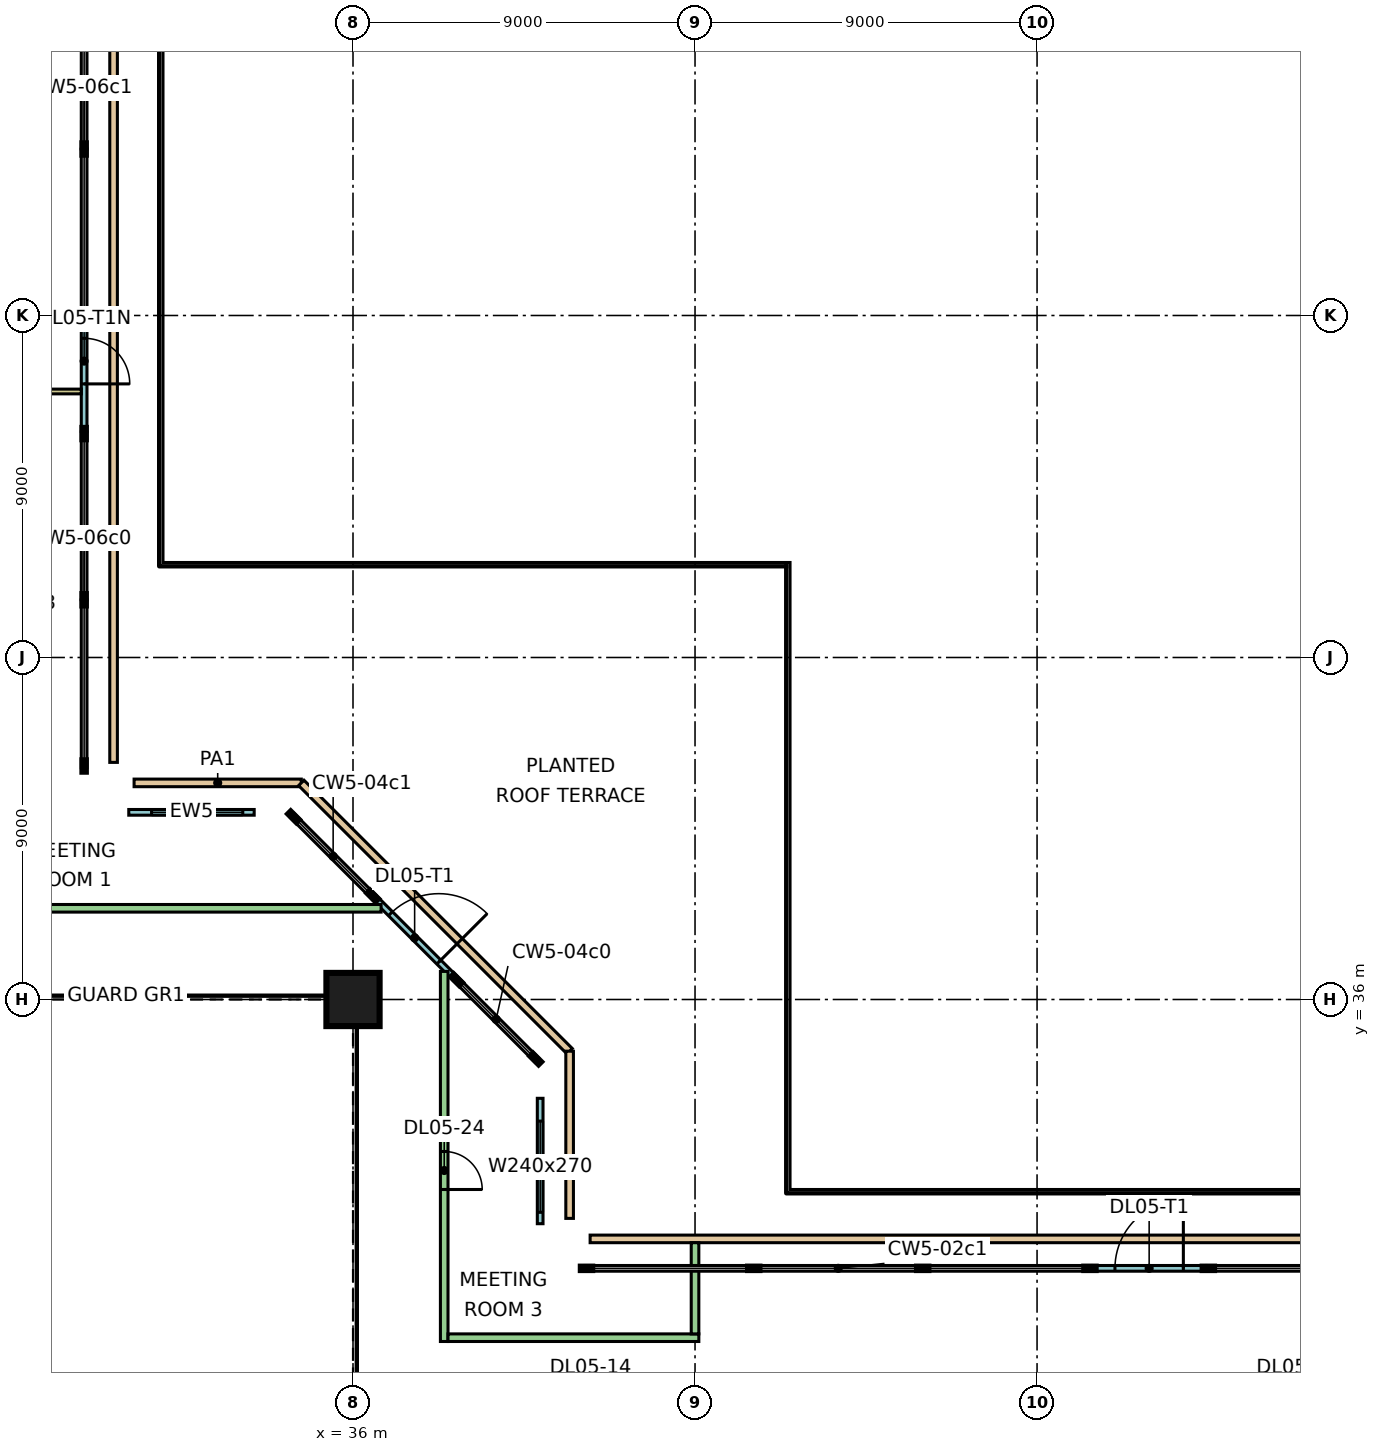
"""IFC4 building model, lengths in metres.
Left out: names, types, materials, properties, quantities, classifications, styles, units other than length and angle.
Written with IfcOpenShell. Run it as: python <this file> out.ifc"""

import sys

from ifc_helpers import new_model, si_unit, direction, frame, frame_2d, origin, origin_2d, place, context, subcontext, project, spatial, rectangle, extrude, element, fill, save


model = new_model("IFC4")
c1 = context("Model", 3, precision=1e-05, world=origin(), true_north=direction((0.0, 1.0)))
c2 = subcontext(c1, "Body", "Model", "MODEL_VIEW")
j1 = project(units=[si_unit("LENGTHUNIT", "METRE"), si_unit("PLANEANGLEUNIT", "RADIAN")], contexts=[c1])
p1 = place(None, origin())
s1 = spatial("IfcSite", under=j1, at=p1, CompositionType="ELEMENT")
p2 = place(p1, origin())
s2 = spatial("IfcBuilding", under=s1, at=p2, CompositionType="ELEMENT")
p3 = place(p2, frame((0.0, 0.0, 26.4)))
s3 = spatial("IfcBuildingStorey", under=s2, at=p3, CompositionType="ELEMENT", Elevation=26.4)
p4 = place(p3, frame((36.0, 36.0, 0.0), z_axis=(0.0, 0.0, 1.0), x_axis=(1.0, 0.0, 0.0)))
e1 = element("IfcColumn", 1, at=p4, inside=s3, PredefinedType="COLUMN", context=c2, shape_type="SweptSolid", body=[
    extrude(rectangle(XDim=1.4, YDim=1.4, at=origin_2d()), origin(), (0.0, 0.0, 1.0), 9.0),
])
p5 = place(p3, frame((58.45, 28.925, 0.0), z_axis=(0.0, 0.0, 1.0), x_axis=(-1.0, 0.0, 0.0)))
e2 = element("IfcWall", 2, at=p5, inside=s3, PredefinedType="SOLIDWALL", context=c2, shape_type="SweptSolid", body=[
    extrude(rectangle(XDim=3.0, YDim=0.15, at=frame_2d((1.5, 0.0))), origin(), (0.0, 0.0, 1.0), 8.45),
])
p6 = place(p5, frame((0.6, 0.0, 0.0)))
e3 = element("IfcOpeningElement", 3, at=p6, cuts=e2, PredefinedType="OPENING", context=c2, shape_type="SweptSolid", body=[
    extrude(rectangle(XDim=1.8, YDim=2.4, at=frame_2d((0.9, 1.2))), frame((0.0, 0.085, 0.0), z_axis=(0.0, -1.0, 0.0), x_axis=(1.0, 0.0, 0.0)), (0.0, 0.0, 1.0), 0.17),
])
p7 = place(p3, frame((40.925, 30.1, 0.0), z_axis=(0.0, 0.0, 1.0), x_axis=(0.0, 1.0, 0.0)))
e4 = element("IfcWall", 4, at=p7, inside=s3, PredefinedType="SOLIDWALL", context=c2, shape_type="SweptSolid", body=[
    extrude(rectangle(XDim=3.3, YDim=0.15, at=frame_2d((1.65, 0.0))), origin(), (0.0, 0.0, 1.0), 8.45),
])
p8 = place(p7, frame((0.3, 0.0, 0.9)))
e5 = element("IfcOpeningElement", 5, at=p8, cuts=e4, PredefinedType="OPENING", context=c2, shape_type="SweptSolid", body=[
    extrude(rectangle(XDim=2.4, YDim=2.7, at=frame_2d((1.2, 1.35))), frame((0.0, 0.085, 0.0), z_axis=(0.0, -1.0, 0.0), x_axis=(1.0, 0.0, 0.0)), (0.0, 0.0, 1.0), 0.17),
])
p9 = place(p3, frame((38.682, 36.561, 0.0), z_axis=(0.0, 0.0, 1.0), x_axis=(-0.707106781187, 0.707106781187, 0.0)))
e6 = element("IfcWall", 6, at=p9, inside=s3, PredefinedType="SOLIDWALL", context=c2, shape_type="SweptSolid", body=[
    extrude(rectangle(XDim=3.0, YDim=0.15, at=frame_2d((1.5, 0.0))), origin(), (0.0, 0.0, 1.0), 8.45),
])
p10 = place(p9, frame((0.6, 0.0, 0.0)))
e7 = element("IfcOpeningElement", 7, at=p10, cuts=e6, PredefinedType="OPENING", context=c2, shape_type="SweptSolid", body=[
    extrude(rectangle(XDim=1.8, YDim=2.4, at=frame_2d((0.9, 1.2))), frame((0.0, 0.085, 0.0), z_axis=(0.0, -1.0, 0.0), x_axis=(1.0, 0.0, 0.0)), (0.0, 0.0, 1.0), 0.17),
])
p11 = place(p3, frame((33.4, 40.925, 0.0), z_axis=(0.0, 0.0, 1.0), x_axis=(-1.0, 0.0, 0.0)))
e8 = element("IfcWall", 8, at=p11, inside=s3, PredefinedType="SOLIDWALL", context=c2, shape_type="SweptSolid", body=[
    extrude(rectangle(XDim=3.3, YDim=0.15, at=frame_2d((1.65, 0.0))), origin(), (0.0, 0.0, 1.0), 8.45),
])
p12 = place(p11, frame((0.3, 0.0, 0.9)))
e9 = element("IfcOpeningElement", 9, at=p12, cuts=e8, PredefinedType="OPENING", context=c2, shape_type="SweptSolid", body=[
    extrude(rectangle(XDim=2.4, YDim=2.7, at=frame_2d((1.2, 1.35))), frame((0.0, 0.085, 0.0), z_axis=(0.0, -1.0, 0.0), x_axis=(1.0, 0.0, 0.0)), (0.0, 0.0, 1.0), 0.17),
])
p13 = place(p3, frame((28.925, 50.95, 0.0), z_axis=(0.0, 0.0, 1.0), x_axis=(0.0, 1.0, 0.0)))
e10 = element("IfcWall", 10, at=p13, inside=s3, PredefinedType="SOLIDWALL", context=c2, shape_type="SweptSolid", body=[
    extrude(rectangle(XDim=3.0, YDim=0.15, at=frame_2d((1.5, 0.0))), origin(), (0.0, 0.0, 1.0), 8.45),
])
p14 = place(p13, frame((1.25, 0.0, 0.0)))
e11 = element("IfcOpeningElement", 11, at=p14, cuts=e10, PredefinedType="OPENING", context=c2, shape_type="SweptSolid", body=[
    extrude(rectangle(XDim=1.2, YDim=2.4, at=frame_2d((0.6, 1.2))), frame((0.0, 0.085, 0.0), z_axis=(0.0, -1.0, 0.0), x_axis=(1.0, 0.0, 0.0)), (0.0, 0.0, 1.0), 0.17),
])
p15 = place(p3, frame((29.7, 63.24, 0.0), z_axis=(0.0, 0.0, 1.0), x_axis=(0.0, -1.0, 0.0)))
e12 = element("IfcWall", 12, at=p15, inside=s3, PredefinedType="PARAPET", context=c2, shape_type="SweptSolid", body=[
    extrude(rectangle(XDim=21.0, YDim=0.2, at=frame_2d((10.5, 0.0))), origin(), (0.0, 0.0, 1.0), 0.5),
])
p16 = place(p3, frame((30.24, 41.7, 0.0), z_axis=(0.0, 0.0, 1.0), x_axis=(1.0, 0.0, 0.0)))
e13 = element("IfcWall", 13, at=p16, inside=s3, PredefinedType="PARAPET", context=c2, shape_type="SweptSolid", body=[
    extrude(rectangle(XDim=4.4, YDim=0.2, at=frame_2d((2.2, 0.0))), origin(), (0.0, 0.0, 1.0), 0.5),
])
p17 = place(p3, frame((34.64, 41.7, 0.0), z_axis=(0.0, 0.0, 1.0), x_axis=(0.707106781187, -0.707106781187, 0.0)))
e14 = element("IfcWall", 14, at=p17, inside=s3, PredefinedType="PARAPET", context=c2, shape_type="SweptSolid", body=[
    extrude(rectangle(XDim=9.985, YDim=0.2, at=frame_2d((4.992, 0.0))), origin(), (0.0, 0.0, 1.0), 0.5),
])
p18 = place(p3, frame((41.7, 34.64, 0.0), z_axis=(0.0, 0.0, 1.0), x_axis=(0.0, -1.0, 0.0)))
e15 = element("IfcWall", 15, at=p18, inside=s3, PredefinedType="PARAPET", context=c2, shape_type="SweptSolid", body=[
    extrude(rectangle(XDim=4.4, YDim=0.2, at=frame_2d((2.2, 0.0))), origin(), (0.0, 0.0, 1.0), 0.5),
])
p19 = place(p3, frame((42.24, 29.7, 0.0), z_axis=(0.0, 0.0, 1.0), x_axis=(1.0, 0.0, 0.0)))
e16 = element("IfcWall", 16, at=p19, inside=s3, PredefinedType="PARAPET", context=c2, shape_type="SweptSolid", body=[
    extrude(rectangle(XDim=30.0, YDim=0.2, at=frame_2d((15.0, 0.0))), origin(), (0.0, 0.0, 1.0), 0.5),
])
p20 = place(p3, frame((27.1, 52.0, 0.0), z_axis=(0.0, 0.0, 1.0), x_axis=(1.0, 0.0, 0.0)))
e17 = element("IfcWall", 17, at=p20, inside=s3, PredefinedType="PARTITIONING", context=c2, shape_type="SweptSolid", body=[
    extrude(rectangle(XDim=1.751, YDim=0.125, at=frame_2d((0.875, 0.0))), origin(), (0.0, 0.0, 1.0), 8.45),
])
p21 = place(p3, frame((27.2, 38.4, 0.0), z_axis=(0.0, 0.0, 1.0), x_axis=(1.0, 0.0, 0.0)))
e18 = element("IfcWall", 18, at=p21, inside=s3, PredefinedType="PARTITIONING", context=c2, shape_type="SweptSolid", body=[
    extrude(rectangle(XDim=9.539, YDim=0.2, at=frame_2d((4.77, 0.0))), origin(), (0.0, 0.0, 1.0), 8.45),
])
p22 = place(p3, frame((38.4, 27.0, 0.0), z_axis=(0.0, 0.0, 1.0), x_axis=(0.0, 1.0, 0.0)))
e19 = element("IfcWall", 19, at=p22, inside=s3, PredefinedType="PARTITIONING", context=c2, shape_type="SweptSolid", body=[
    extrude(rectangle(XDim=9.739, YDim=0.2, at=frame_2d((4.87, 0.0))), origin(), (0.0, 0.0, 1.0), 8.45),
])
p23 = place(p22, frame((4.0, 0.0, 0.0)))
e20 = element("IfcOpeningElement", 20, at=p23, cuts=e19, PredefinedType="OPENING", context=c2, shape_type="SweptSolid", body=[
    extrude(rectangle(XDim=1.0, YDim=2.1, at=frame_2d((0.5, 1.05))), frame((0.0, 0.11, 0.0), z_axis=(0.0, -1.0, 0.0), x_axis=(1.0, 0.0, 0.0)), (0.0, 0.0, 1.0), 0.22),
])
p24 = place(p3, frame((38.5, 27.1, 0.0), z_axis=(0.0, 0.0, 1.0), x_axis=(1.0, 0.0, 0.0)))
e21 = element("IfcWall", 21, at=p24, inside=s3, PredefinedType="PARTITIONING", context=c2, shape_type="SweptSolid", body=[
    extrude(rectangle(XDim=6.6, YDim=0.2, at=frame_2d((3.3, 0.0))), origin(), (0.0, 0.0, 1.0), 8.45),
])
p25 = place(p3, frame((45.0, 27.2, 0.0), z_axis=(0.0, 0.0, 1.0), x_axis=(0.0, 1.0, 0.0)))
e22 = element("IfcWall", 22, at=p25, inside=s3, PredefinedType="PARTITIONING", context=c2, shape_type="SweptSolid", body=[
    extrude(rectangle(XDim=2.4, YDim=0.2, at=frame_2d((1.2, 0.0))), origin(), (0.0, 0.0, 1.0), 8.45),
])
p26 = place(p6, frame((1.8, 0.0, 0.0), z_axis=(0.0, 0.0, 1.0), x_axis=(-1.0, 0.0, 0.0)))
e23 = element("IfcDoor", 23, at=p26, inside=s3, OperationType="DOUBLE_DOOR_SINGLE_SWING", PredefinedType="DOOR", context=c2, shape_type="SweptSolid", body=[
    extrude(rectangle(XDim=1.8, YDim=2.4, at=frame_2d((0.9, 1.2))), frame((0.0, 0.025, 0.0), z_axis=(0.0, -1.0, 0.0), x_axis=(1.0, 0.0, 0.0)), (0.0, 0.0, 1.0), 0.05),
])
fill(e3, e23)
p27 = place(p8, origin())
e24 = element("IfcWindow", 24, at=p27, inside=s3, PartitioningType="SINGLE_PANEL", PredefinedType="WINDOW", context=c2, shape_type="SweptSolid", body=[
    extrude(rectangle(XDim=2.4, YDim=2.7, at=frame_2d((1.2, 1.35))), frame((0.0, 0.03, 0.0), z_axis=(0.0, -1.0, 0.0), x_axis=(1.0, 0.0, 0.0)), (0.0, 0.0, 1.0), 0.06),
])
fill(e5, e24)
p28 = place(p10, frame((1.8, 0.0, 0.0), z_axis=(0.0, 0.0, 1.0), x_axis=(-1.0, 0.0, 0.0)))
e25 = element("IfcDoor", 25, at=p28, inside=s3, OperationType="DOUBLE_DOOR_SINGLE_SWING", PredefinedType="DOOR", context=c2, shape_type="SweptSolid", body=[
    extrude(rectangle(XDim=1.8, YDim=2.4, at=frame_2d((0.9, 1.2))), frame((0.0, 0.025, 0.0), z_axis=(0.0, -1.0, 0.0), x_axis=(1.0, 0.0, 0.0)), (0.0, 0.0, 1.0), 0.05),
])
fill(e7, e25)
p29 = place(p12, origin())
e26 = element("IfcWindow", 26, at=p29, inside=s3, PartitioningType="SINGLE_PANEL", PredefinedType="WINDOW", context=c2, shape_type="SweptSolid", body=[
    extrude(rectangle(XDim=2.4, YDim=2.7, at=frame_2d((1.2, 1.35))), frame((0.0, 0.03, 0.0), z_axis=(0.0, -1.0, 0.0), x_axis=(1.0, 0.0, 0.0)), (0.0, 0.0, 1.0), 0.06),
])
fill(e9, e26)
p30 = place(p14, frame((1.2, 0.0, 0.0), z_axis=(0.0, 0.0, 1.0), x_axis=(-1.0, 0.0, 0.0)))
e27 = element("IfcDoor", 27, at=p30, inside=s3, OperationType="DOUBLE_DOOR_SINGLE_SWING", PredefinedType="DOOR", context=c2, shape_type="SweptSolid", body=[
    extrude(rectangle(XDim=1.2, YDim=2.4, at=frame_2d((0.6, 1.2))), frame((0.0, 0.025, 0.0), z_axis=(0.0, -1.0, 0.0), x_axis=(1.0, 0.0, 0.0)), (0.0, 0.0, 1.0), 0.05),
])
fill(e11, e27)
p31 = place(p23, frame((1.0, 0.0, 0.0), z_axis=(0.0, 0.0, 1.0), x_axis=(-1.0, 0.0, 0.0)))
e28 = element("IfcDoor", 28, at=p31, inside=s3, OperationType="SINGLE_SWING_LEFT", PredefinedType="DOOR", context=c2, shape_type="SweptSolid", body=[
    extrude(rectangle(XDim=1.0, YDim=2.1, at=frame_2d((0.5, 1.05))), frame((0.0, 0.025, 0.0), z_axis=(0.0, -1.0, 0.0), x_axis=(1.0, 0.0, 0.0)), (0.0, 0.0, 1.0), 0.05),
])
fill(e20, e28)
save(model, sys.argv[1])
